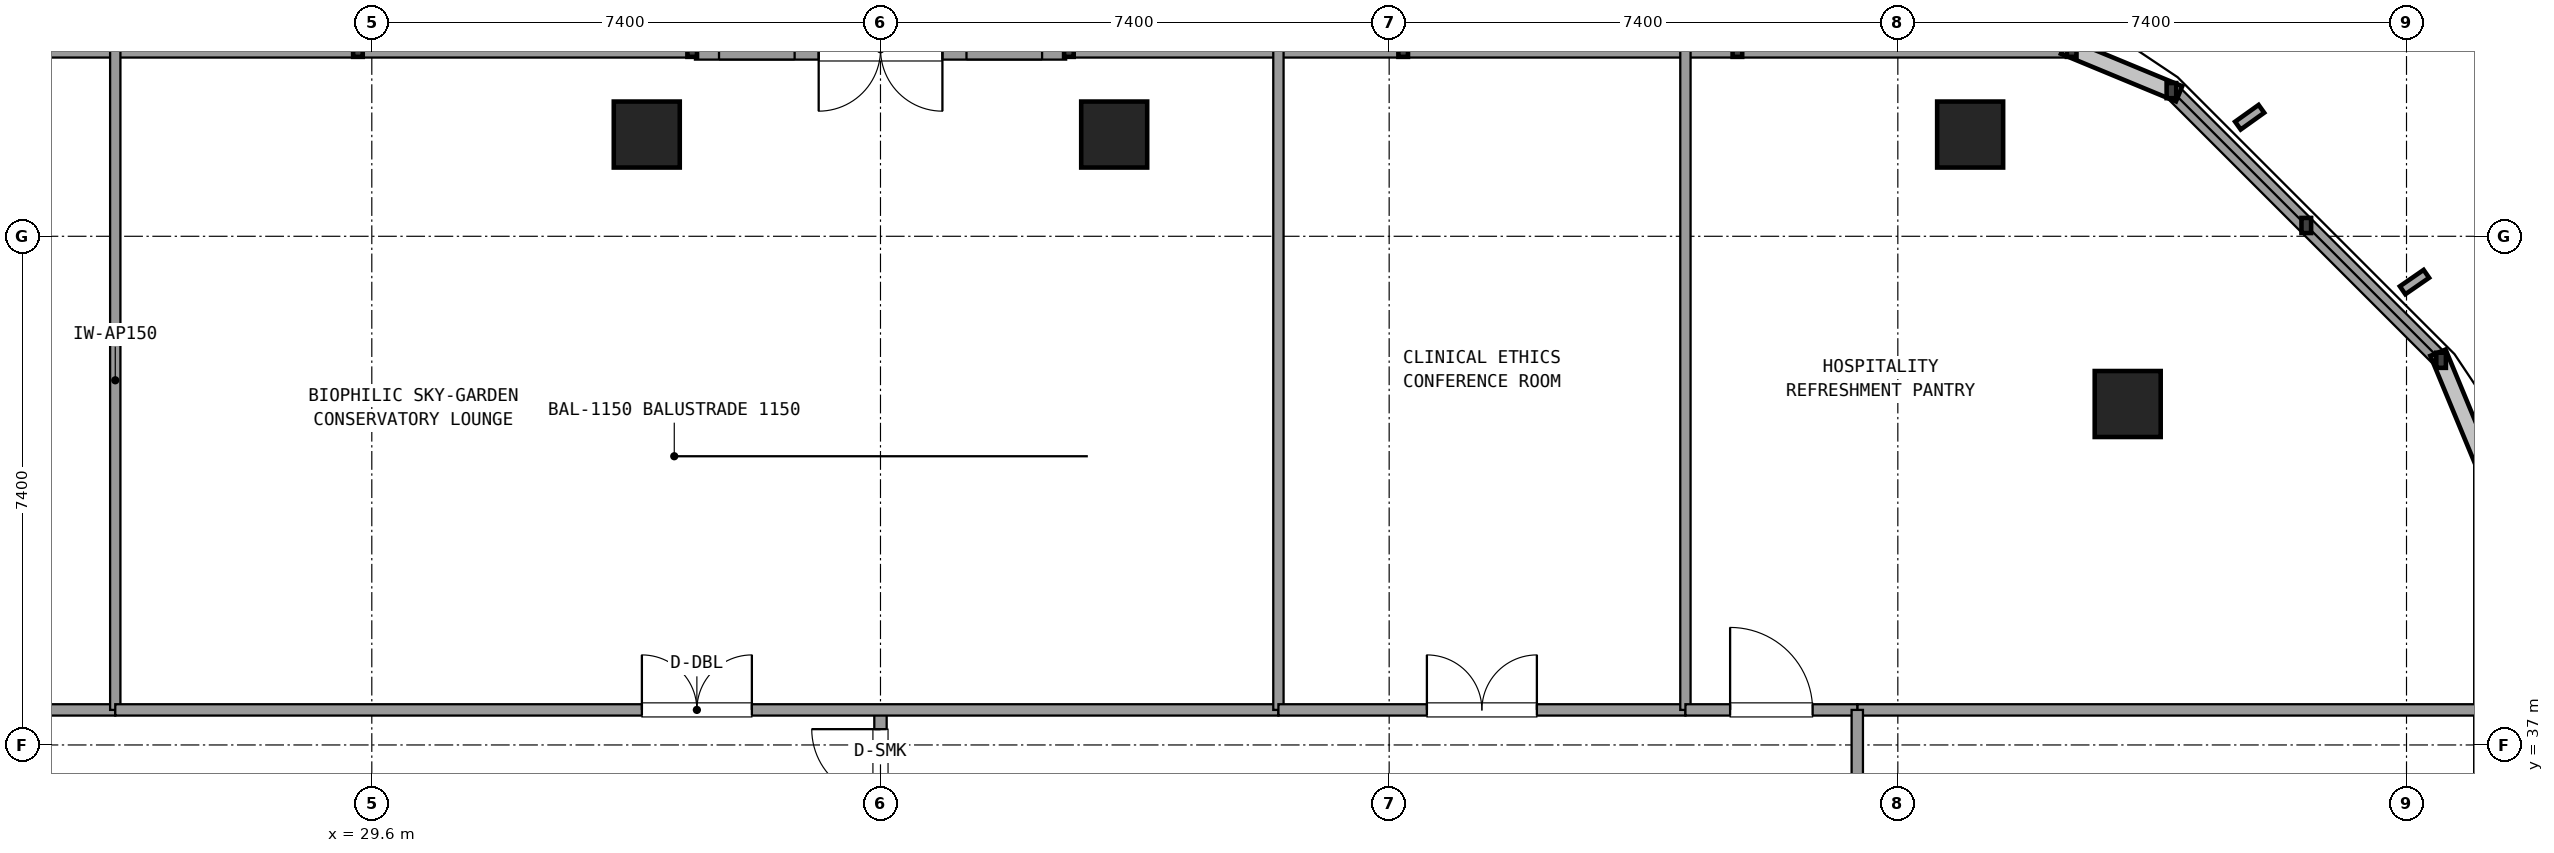
"""IFC4 building model, lengths in metres.
Left out: names, types, materials, properties, quantities, classifications, styles, units other than length and angle.
Written with IfcOpenShell. Run it as: python <this file> out.ifc"""

import sys

from ifc_helpers import new_model, si_unit, direction, frame, frame_2d, origin, origin_2d, place, context, subcontext, project, spatial, rectangle, extrude, element, fill, save


model = new_model("IFC4")
c1 = context("Model", 3, precision=1e-05, world=origin(), true_north=direction((0.0, 1.0)))
c2 = subcontext(c1, "Body", "Model", "MODEL_VIEW")
j1 = project(units=[si_unit("LENGTHUNIT", "METRE"), si_unit("PLANEANGLEUNIT", "RADIAN")], contexts=[c1])
p1 = place(None, origin())
s1 = spatial("IfcSite", under=j1, at=p1, CompositionType="ELEMENT")
p2 = place(p1, origin())
s2 = spatial("IfcBuilding", under=s1, at=p2, CompositionType="ELEMENT")
p3 = place(p2, frame((0.0, 0.0, 129.06)))
s3 = spatial("IfcBuildingStorey", under=s2, at=p3, CompositionType="ELEMENT", Elevation=129.06)
for number, where, z_axis, x_axis in (
    (1, (55.144, 41.96, 0.023), (0.0, 0.0, 1.0), (1.0, 0.0, 0.0)),
    (2, (52.852, 45.88, 0.023), (0.0, 0.0, 1.0), (1.0, 0.0, 0.0)),
):
    element("IfcColumn", number, at=place(p3, frame(where, z_axis=z_axis, x_axis=x_axis)), inside=s3, PredefinedType="COLUMN", context=c2, shape_type="SweptSolid", body=[
        extrude(rectangle(XDim=0.96, YDim=0.96, at=origin_2d()), origin(), (0.0, 0.0, 1.0), 5.737),
    ])
for number, where, z_axis, x_axis in (
    (3, (40.4, 45.88, 0.021), (0.0, 0.0, 1.0), (1.0, 0.0, 0.0)),
    (4, (33.6, 45.88, 0.021), (0.0, 0.0, 1.0), (1.0, 0.0, 0.0)),
):
    element("IfcColumn", number, at=place(p3, frame(where, z_axis=z_axis, x_axis=x_axis)), inside=s3, PredefinedType="COLUMN", context=c2, shape_type="SweptSolid", body=[
        extrude(rectangle(XDim=0.96, YDim=0.96, at=origin_2d()), origin(), (0.0, 0.0, 1.0), 5.739),
    ])
p4 = place(p3, frame((60.304, 28.639, 0.0), z_axis=(0.0, 0.0, 1.0), x_axis=(0.0, 1.0, 0.0)))
e5 = element("IfcWall", 5, at=p4, inside=s3, PredefinedType="SOLIDWALL", context=c2, shape_type="SweptSolid", body=[
    extrude(rectangle(XDim=12.506, YDim=0.24, at=frame_2d((6.253, 0.0))), origin(), (0.0, 0.0, 1.0), 0.85),
])
p5 = place(p3, frame((59.703, 42.596, 0.0), z_axis=(0.0, 0.0, 1.0), x_axis=(-0.707084777957, 0.707128783731, 0.0)))
e6 = element("IfcWall", 6, at=p5, inside=s3, PredefinedType="SOLIDWALL", context=c2, shape_type="SweptSolid", body=[
    extrude(rectangle(XDim=5.548, YDim=0.24, at=frame_2d((2.774, 0.0))), origin(), (0.0, 0.0, 1.0), 0.85),
])
p6 = place(p3, frame((39.701, 47.12, 0.0), z_axis=(0.0, 0.0, 1.0), x_axis=(-1.0, 0.0, 0.0)))
e7 = element("IfcWall", 7, at=p6, inside=s3, PredefinedType="SOLIDWALL", context=c2, shape_type="SweptSolid", body=[
    extrude(rectangle(XDim=5.4, YDim=0.3, at=frame_2d((2.7, 0.0))), origin(), (0.0, 0.0, 1.0), 4.83),
])
p7 = place(p6, frame((1.8, 0.0, 0.0)))
e8 = element("IfcOpeningElement", 8, at=p7, cuts=e7, PredefinedType="OPENING", context=c2, shape_type="SweptSolid", body=[
    extrude(rectangle(XDim=1.8, YDim=2.25, at=frame_2d((0.9, 1.125))), frame((0.0, 0.16, 0.0), z_axis=(0.0, -1.0, 0.0), x_axis=(1.0, 0.0, 0.0)), (0.0, 0.0, 1.0), 0.32),
])
p8 = place(p6, frame((0.35, 0.0, 0.4)))
e9 = element("IfcOpeningElement", 9, at=p8, cuts=e7, PredefinedType="OPENING", context=c2, shape_type="SweptSolid", body=[
    extrude(rectangle(XDim=1.1, YDim=1.8, at=frame_2d((0.55, 0.9))), frame((0.0, 0.16, 0.0), z_axis=(0.0, -1.0, 0.0), x_axis=(1.0, 0.0, 0.0)), (0.0, 0.0, 1.0), 0.32),
])
p9 = place(p6, frame((3.95, 0.0, 0.4)))
e10 = element("IfcOpeningElement", 10, at=p9, cuts=e7, PredefinedType="OPENING", context=c2, shape_type="SweptSolid", body=[
    extrude(rectangle(XDim=1.1, YDim=1.8, at=frame_2d((0.55, 0.9))), frame((0.0, 0.16, 0.0), z_axis=(0.0, -1.0, 0.0), x_axis=(1.0, 0.0, 0.0)), (0.0, 0.0, 1.0), 0.32),
])
p10 = place(p3, frame((54.329, 47.12, 0.0), z_axis=(0.0, 0.0, 1.0), x_axis=(-1.0, 0.0, 0.0)))
e11 = element("IfcWall", 11, at=p10, inside=s3, PredefinedType="SOLIDWALL", context=c2, shape_type="SweptSolid", body=[
    extrude(rectangle(XDim=14.588, YDim=0.24, at=frame_2d((7.294, 0.0))), origin(), (0.0, 0.0, 1.0), 0.85),
])
p11 = place(p3, frame((34.261, 47.12, 0.0), z_axis=(0.0, 0.0, 1.0), x_axis=(-1.0, 0.0, 0.0)))
e12 = element("IfcWall", 12, at=p11, inside=s3, PredefinedType="SOLIDWALL", context=c2, shape_type="SweptSolid", body=[
    extrude(rectangle(XDim=14.59, YDim=0.24, at=frame_2d((7.295, 0.0))), origin(), (0.0, 0.0, 1.0), 0.85),
])
p12 = place(p3, frame((37.0, 34.95, 0.0), z_axis=(0.0, 0.0, 1.0), x_axis=(0.0, 1.0, 0.0)))
e13 = element("IfcWall", 13, at=p12, inside=s3, PredefinedType="PARTITIONING", context=c2, shape_type="SweptSolid", body=[
    extrude(rectangle(XDim=2.56, YDim=0.18, at=frame_2d((1.28, 0.0))), origin(), (0.0, 0.0, 1.0), 4.77),
])
p13 = place(p12, frame((0.28, 0.0, 0.0)))
e14 = element("IfcOpeningElement", 14, at=p13, cuts=e13, PredefinedType="OPENING", context=c2, shape_type="SweptSolid", body=[
    extrude(rectangle(XDim=2.0, YDim=2.2, at=frame_2d((1.0, 1.1))), frame((0.0, 0.1, 0.0), z_axis=(0.0, -1.0, 0.0), x_axis=(1.0, 0.0, 0.0)), (0.0, 0.0, 1.0), 0.2),
])
p14 = place(p3, frame((51.21, 37.51, 0.0), z_axis=(0.0, 0.0, 1.0), x_axis=(1.0, 0.0, 0.0)))
e15 = element("IfcWall", 15, at=p14, inside=s3, PredefinedType="PARTITIONING", context=c2, shape_type="SweptSolid", body=[
    extrude(rectangle(XDim=9.074, YDim=0.165, at=frame_2d((4.537, 0.0))), origin(), (0.0, 0.0, 1.0), 4.77),
])
p15 = place(p3, frame((22.79, 37.51, 0.0), z_axis=(0.0, 0.0, 1.0), x_axis=(1.0, 0.0, 0.0)))
e16 = element("IfcWall", 16, at=p15, inside=s3, PredefinedType="PARTITIONING", context=c2, shape_type="SweptSolid", body=[
    extrude(rectangle(XDim=3.078, YDim=0.165, at=frame_2d((1.539, 0.0))), origin(), (0.0, 0.0, 1.0), 4.77),
])
p16 = place(p15, frame((0.939, 0.0, 0.0)))
e17 = element("IfcOpeningElement", 17, at=p16, cuts=e16, PredefinedType="OPENING", context=c2, shape_type="SweptSolid", body=[
    extrude(rectangle(XDim=1.2, YDim=2.15, at=frame_2d((0.6, 1.075))), frame((0.0, 0.093, 0.0), z_axis=(0.0, -1.0, 0.0), x_axis=(1.0, 0.0, 0.0)), (0.0, 0.0, 1.0), 0.185),
])
p17 = place(p3, frame((25.868, 37.51, 0.0), z_axis=(0.0, 0.0, 1.0), x_axis=(0.0, 1.0, 0.0)))
e18 = element("IfcWall", 18, at=p17, inside=s3, PredefinedType="PARTITIONING", context=c2, shape_type="SweptSolid", body=[
    extrude(rectangle(XDim=9.59, YDim=0.15, at=frame_2d((4.795, 0.0))), origin(), (0.0, 0.0, 1.0), 4.77),
])
p18 = place(p3, frame((25.868, 37.51, 0.0), z_axis=(0.0, 0.0, 1.0), x_axis=(1.0, 0.0, 0.0)))
e19 = element("IfcWall", 19, at=p18, inside=s3, PredefinedType="PARTITIONING", context=c2, shape_type="SweptSolid", body=[
    extrude(rectangle(XDim=16.921, YDim=0.165, at=frame_2d((8.46, 0.0))), origin(), (0.0, 0.0, 1.0), 4.77),
])
p19 = place(p18, frame((7.661, 0.0, 0.0)))
e20 = element("IfcOpeningElement", 20, at=p19, cuts=e19, PredefinedType="OPENING", context=c2, shape_type="SweptSolid", body=[
    extrude(rectangle(XDim=1.6, YDim=2.2, at=frame_2d((0.8, 1.1))), frame((0.0, 0.093, 0.0), z_axis=(0.0, -1.0, 0.0), x_axis=(1.0, 0.0, 0.0)), (0.0, 0.0, 1.0), 0.185),
])
p20 = place(p3, frame((42.789, 37.51, 0.0), z_axis=(0.0, 0.0, 1.0), x_axis=(0.0, 1.0, 0.0)))
e21 = element("IfcWall", 21, at=p20, inside=s3, PredefinedType="PARTITIONING", context=c2, shape_type="SweptSolid", body=[
    extrude(rectangle(XDim=9.59, YDim=0.15, at=frame_2d((4.795, 0.0))), origin(), (0.0, 0.0, 1.0), 4.77),
])
p21 = place(p3, frame((42.789, 37.51, 0.0), z_axis=(0.0, 0.0, 1.0), x_axis=(1.0, 0.0, 0.0)))
e22 = element("IfcWall", 22, at=p21, inside=s3, PredefinedType="PARTITIONING", context=c2, shape_type="SweptSolid", body=[
    extrude(rectangle(XDim=5.921, YDim=0.165, at=frame_2d((2.96, 0.0))), origin(), (0.0, 0.0, 1.0), 4.77),
])
p22 = place(p21, frame((2.16, 0.0, 0.0)))
e23 = element("IfcOpeningElement", 23, at=p22, cuts=e22, PredefinedType="OPENING", context=c2, shape_type="SweptSolid", body=[
    extrude(rectangle(XDim=1.6, YDim=2.2, at=frame_2d((0.8, 1.1))), frame((0.0, 0.093, 0.0), z_axis=(0.0, -1.0, 0.0), x_axis=(1.0, 0.0, 0.0)), (0.0, 0.0, 1.0), 0.185),
])
p23 = place(p3, frame((48.71, 37.51, 0.0), z_axis=(0.0, 0.0, 1.0), x_axis=(0.0, 1.0, 0.0)))
e24 = element("IfcWall", 24, at=p23, inside=s3, PredefinedType="PARTITIONING", context=c2, shape_type="SweptSolid", body=[
    extrude(rectangle(XDim=9.59, YDim=0.15, at=frame_2d((4.795, 0.0))), origin(), (0.0, 0.0, 1.0), 4.77),
])
p24 = place(p3, frame((48.71, 37.51, 0.0), z_axis=(0.0, 0.0, 1.0), x_axis=(1.0, 0.0, 0.0)))
e25 = element("IfcWall", 25, at=p24, inside=s3, PredefinedType="PARTITIONING", context=c2, shape_type="SweptSolid", body=[
    extrude(rectangle(XDim=2.5, YDim=0.165, at=frame_2d((1.25, 0.0))), origin(), (0.0, 0.0, 1.0), 4.77),
])
p25 = place(p24, frame((0.65, 0.0, 0.0)))
e26 = element("IfcOpeningElement", 26, at=p25, cuts=e25, PredefinedType="OPENING", context=c2, shape_type="SweptSolid", body=[
    extrude(rectangle(XDim=1.2, YDim=2.15, at=frame_2d((0.6, 1.075))), frame((0.0, 0.093, 0.0), z_axis=(0.0, -1.0, 0.0), x_axis=(1.0, 0.0, 0.0)), (0.0, 0.0, 1.0), 0.185),
])
p26 = place(p3, frame((51.21, 21.488, 0.0), z_axis=(0.0, 0.0, 1.0), x_axis=(0.0, 1.0, 0.0)))
e27 = element("IfcWall", 27, at=p26, inside=s3, PredefinedType="PARTITIONING", context=c2, shape_type="SweptSolid", body=[
    extrude(rectangle(XDim=16.022, YDim=0.165, at=frame_2d((8.011, 0.0))), origin(), (0.0, 0.0, 1.0), 4.77),
])
p27 = place(p26, frame((7.211, 0.0, 0.0)))
e28 = element("IfcOpeningElement", 28, at=p27, cuts=e27, PredefinedType="OPENING", context=c2, shape_type="SweptSolid", body=[
    extrude(rectangle(XDim=1.6, YDim=2.2, at=frame_2d((0.8, 1.1))), frame((0.0, 0.093, 0.0), z_axis=(0.0, -1.0, 0.0), x_axis=(1.0, 0.0, 0.0)), (0.0, 0.0, 1.0), 0.185),
])
p28 = place(p13, origin())
e29 = element("IfcDoor", 29, at=p28, inside=s3, OperationType="DOUBLE_DOOR_SINGLE_SWING", PredefinedType="DOOR", context=c2, shape_type="SweptSolid", body=[
    extrude(rectangle(XDim=2.0, YDim=2.2, at=frame_2d((1.0, 1.1))), frame((0.0, 0.025, 0.0), z_axis=(0.0, -1.0, 0.0), x_axis=(1.0, 0.0, 0.0)), (0.0, 0.0, 1.0), 0.05),
])
fill(e14, e29)
p29 = place(p19, origin())
e30 = element("IfcDoor", 30, at=p29, inside=s3, OperationType="DOUBLE_DOOR_SINGLE_SWING", PredefinedType="DOOR", context=c2, shape_type="SweptSolid", body=[
    extrude(rectangle(XDim=1.6, YDim=2.2, at=frame_2d((0.8, 1.1))), frame((0.0, 0.025, 0.0), z_axis=(0.0, -1.0, 0.0), x_axis=(1.0, 0.0, 0.0)), (0.0, 0.0, 1.0), 0.05),
])
fill(e20, e30)
p30 = place(p22, origin())
e31 = element("IfcDoor", 31, at=p30, inside=s3, OperationType="DOUBLE_DOOR_SINGLE_SWING", PredefinedType="DOOR", context=c2, shape_type="SweptSolid", body=[
    extrude(rectangle(XDim=1.6, YDim=2.2, at=frame_2d((0.8, 1.1))), frame((0.0, 0.025, 0.0), z_axis=(0.0, -1.0, 0.0), x_axis=(1.0, 0.0, 0.0)), (0.0, 0.0, 1.0), 0.05),
])
fill(e23, e31)
p31 = place(p25, origin())
e32 = element("IfcDoor", 32, at=p31, inside=s3, OperationType="SINGLE_SWING_LEFT", PredefinedType="DOOR", context=c2, shape_type="SweptSolid", body=[
    extrude(rectangle(XDim=1.2, YDim=2.15, at=frame_2d((0.6, 1.075))), frame((0.0, 0.025, 0.0), z_axis=(0.0, -1.0, 0.0), x_axis=(1.0, 0.0, 0.0)), (0.0, 0.0, 1.0), 0.05),
])
fill(e26, e32)
save(model, sys.argv[1])
